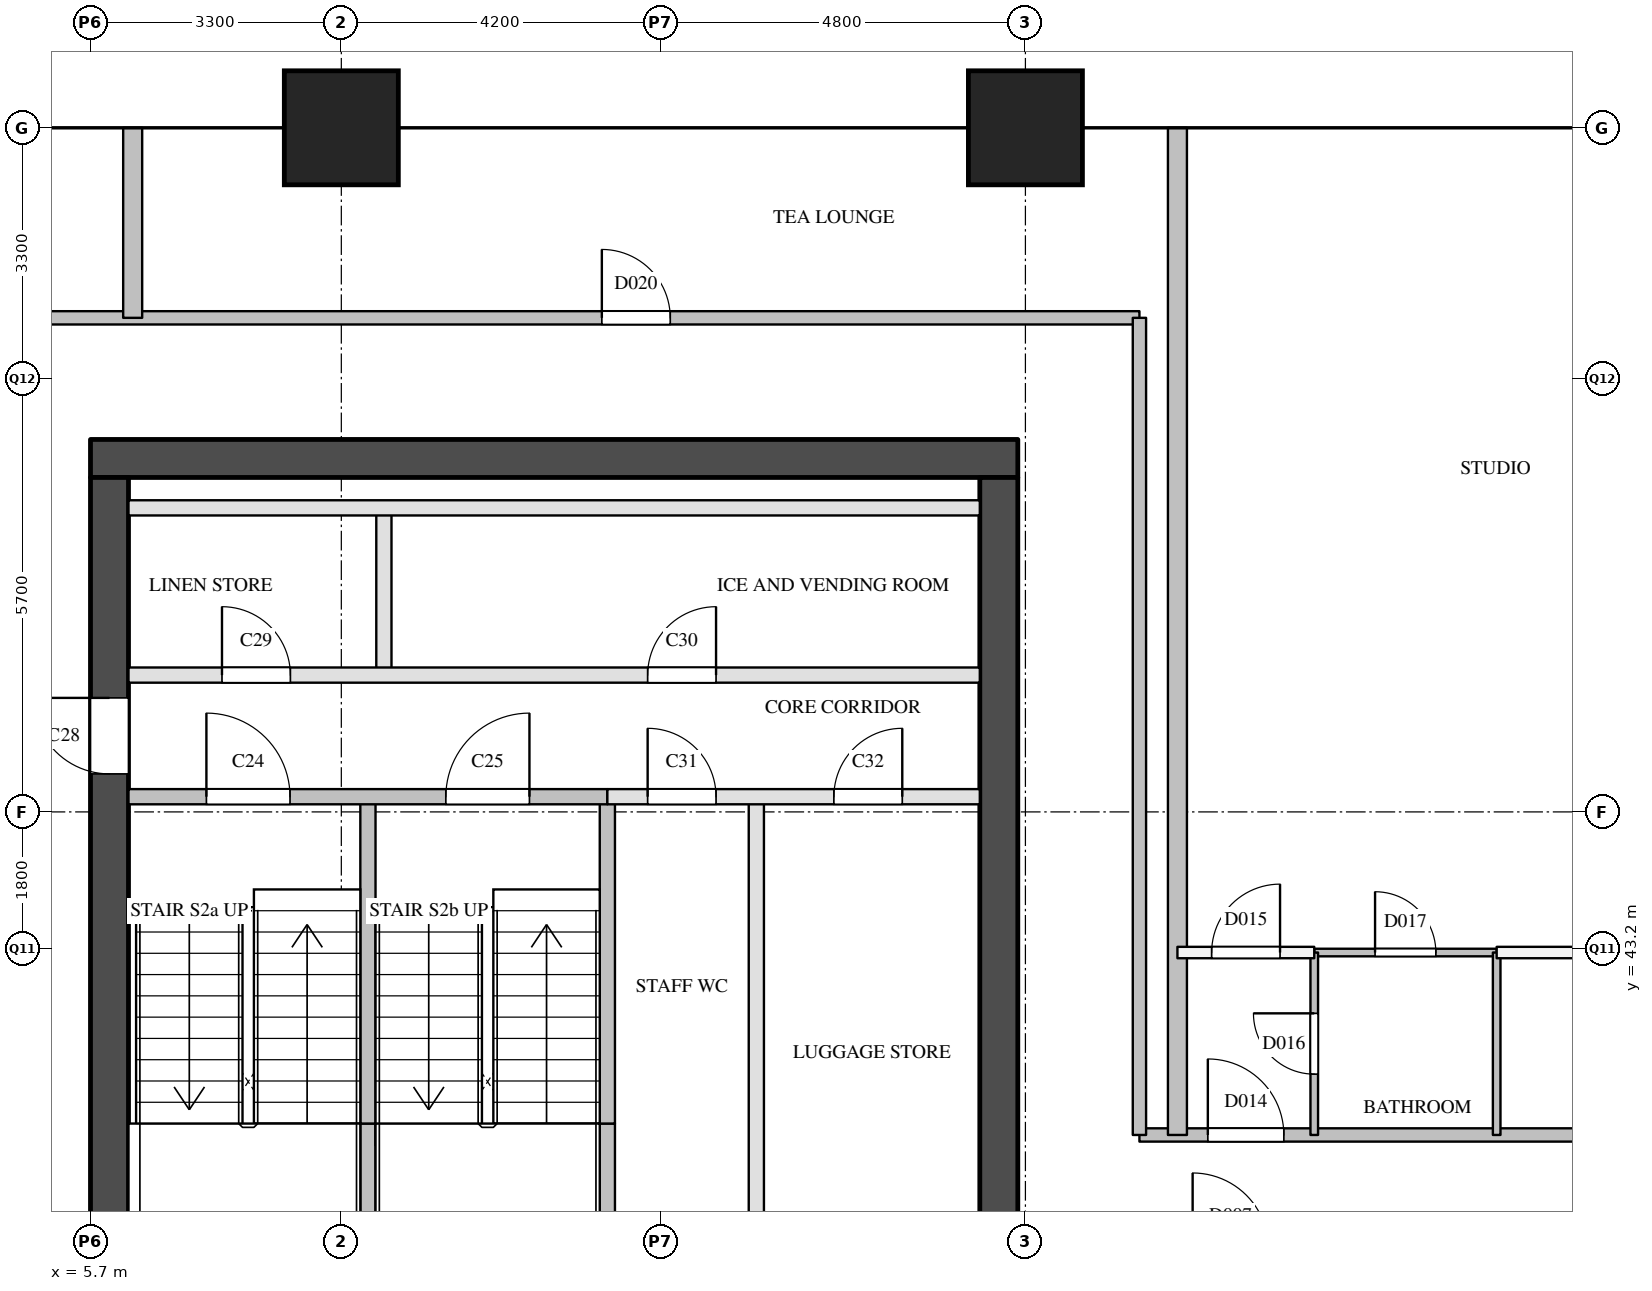
"""IFC4 building model, lengths in metres.
Left out: names, types, materials, properties, quantities, classifications, styles, units other than length and angle.
Written with IfcOpenShell. Run it as: python <this file> out.ifc"""

import sys

from ifc_helpers import new_model, si_unit, direction, frame, frame_2d, origin, origin_2d, place, context, subcontext, project, spatial, rectangle, extrude, element, fill, save


model = new_model("IFC4")
c1 = context("Model", 3, precision=1e-05, world=origin(), true_north=direction((0.0, 1.0)))
c2 = subcontext(c1, "Body", "Model", "MODEL_VIEW")
j1 = project(units=[si_unit("LENGTHUNIT", "METRE"), si_unit("PLANEANGLEUNIT", "RADIAN")], contexts=[c1])
p1 = place(None, origin())
s1 = spatial("IfcSite", under=j1, at=p1, CompositionType="ELEMENT")
p2 = place(p1, origin())
s2 = spatial("IfcBuilding", under=s1, at=p2, CompositionType="ELEMENT")
p3 = place(p2, frame((0.0, 0.0, 142.7)))
s3 = spatial("IfcBuildingStorey", under=s2, at=p3, CompositionType="ELEMENT", Elevation=142.7)
for number, where, z_axis, x_axis in (
    (1, (9.0, 54.0, 0.0), (0.0, 0.0, 1.0), (1.0, 0.0, 0.0)),
    (2, (18.0, 54.0, 0.0), (0.0, 0.0, 1.0), (1.0, 0.0, 0.0)),
):
    element("IfcColumn", number, at=place(p3, frame(where, z_axis=z_axis, x_axis=x_axis)), inside=s3, PredefinedType="COLUMN", context=c2, shape_type="SweptSolid", body=[
        extrude(rectangle(XDim=1.5, YDim=1.5, at=origin_2d()), origin(), (0.0, 0.0, 1.0), 3.9),
    ])
p4 = place(p3, frame((5.7, 49.65, 0.0), z_axis=(0.0, 0.0, 1.0), x_axis=(1.0, 0.0, 0.0)))
e3 = element("IfcWall", 3, at=p4, inside=s3, PredefinedType="SHEAR", context=c2, shape_type="SweptSolid", body=[
    extrude(rectangle(XDim=12.2, YDim=0.5, at=frame_2d((6.1, 0.0))), origin(), (0.0, 0.0, 1.0), 3.6),
])
p5 = place(p3, frame((5.95, 29.1, 0.0), z_axis=(0.0, 0.0, 1.0), x_axis=(0.0, 1.0, 0.0)))
e4 = element("IfcWall", 4, at=p5, inside=s3, PredefinedType="SHEAR", context=c2, shape_type="SweptSolid", body=[
    extrude(rectangle(XDim=20.3, YDim=0.5, at=frame_2d((10.15, 0.0))), origin(), (0.0, 0.0, 1.0), 3.6),
])
p6 = place(p5, frame((3.45, 0.0, 0.0)))
e5 = element("IfcOpeningElement", 5, at=p6, cuts=e4, PredefinedType="OPENING", context=c2, shape_type="SweptSolid", body=[
    extrude(rectangle(XDim=1.0, YDim=2.1, at=frame_2d((0.5, 1.05))), frame((0.0, 0.26, 0.0), z_axis=(0.0, -1.0, 0.0), x_axis=(1.0, 0.0, 0.0)), (0.0, 0.0, 1.0), 0.52),
])
p7 = place(p5, frame((16.4, 0.0, 0.0)))
e6 = element("IfcOpeningElement", 6, at=p7, cuts=e4, PredefinedType="OPENING", context=c2, shape_type="SweptSolid", body=[
    extrude(rectangle(XDim=1.0, YDim=2.1, at=frame_2d((0.5, 1.05))), frame((0.0, 0.26, 0.0), z_axis=(0.0, -1.0, 0.0), x_axis=(1.0, 0.0, 0.0)), (0.0, 0.0, 1.0), 0.52),
])
p8 = place(p3, frame((17.65, 29.1, 0.0), z_axis=(0.0, 0.0, 1.0), x_axis=(0.0, 1.0, 0.0)))
e7 = element("IfcWall", 7, at=p8, inside=s3, PredefinedType="SHEAR", context=c2, shape_type="SweptSolid", body=[
    extrude(rectangle(XDim=20.3, YDim=0.5, at=frame_2d((10.15, 0.0))), origin(), (0.0, 0.0, 1.0), 3.6),
])
p9 = place(p8, frame((1.25, 0.0, 0.0)))
e8 = element("IfcOpeningElement", 8, at=p9, cuts=e7, PredefinedType="OPENING", context=c2, shape_type="SweptSolid", body=[
    extrude(rectangle(XDim=0.7, YDim=2.1, at=frame_2d((0.35, 1.05))), frame((0.0, 0.26, 0.0), z_axis=(0.0, -1.0, 0.0), x_axis=(1.0, 0.0, 0.0)), (0.0, 0.0, 1.0), 0.52),
])
p10 = place(p8, frame((7.05, 0.0, 0.0)))
e9 = element("IfcOpeningElement", 9, at=p10, cuts=e7, PredefinedType="OPENING", context=c2, shape_type="SweptSolid", body=[
    extrude(rectangle(XDim=0.7, YDim=2.1, at=frame_2d((0.35, 1.05))), frame((0.0, 0.26, 0.0), z_axis=(0.0, -1.0, 0.0), x_axis=(1.0, 0.0, 0.0)), (0.0, 0.0, 1.0), 0.52),
])
p11 = place(p8, frame((3.6, 0.0, 0.0)))
e10 = element("IfcOpeningElement", 10, at=p11, cuts=e7, PredefinedType="OPENING", context=c2, shape_type="SweptSolid", body=[
    extrude(rectangle(XDim=1.8, YDim=2.1, at=frame_2d((0.9, 1.05))), frame((0.0, 0.26, 0.0), z_axis=(0.0, -1.0, 0.0), x_axis=(1.0, 0.0, 0.0)), (0.0, 0.0, 1.0), 0.52),
])
p12 = place(p3, frame((9.35, 39.0, 0.0), z_axis=(0.0, 0.0, 1.0), x_axis=(0.0, 1.0, 0.0)))
e11 = element("IfcWall", 11, at=p12, inside=s3, PredefinedType="SOLIDWALL", context=c2, shape_type="SweptSolid", body=[
    extrude(rectangle(XDim=1.9, YDim=0.2, at=frame_2d((0.95, 0.0))), origin(), (0.0, 0.0, 1.0), 3.6),
])
p13 = place(p3, frame((9.35, 40.9, 0.0), z_axis=(0.0, 0.0, 1.0), x_axis=(0.0, 1.0, 0.0)))
e12 = element("IfcWall", 12, at=p13, inside=s3, PredefinedType="SOLIDWALL", context=c2, shape_type="SweptSolid", body=[
    extrude(rectangle(XDim=4.3, YDim=0.2, at=frame_2d((2.15, 0.0))), origin(), (0.0, 0.0, 1.0), 3.6),
])
p14 = place(p3, frame((9.56, 46.8, 0.0), z_axis=(0.0, 0.0, 1.0), x_axis=(0.0, 1.0, 0.0)))
e13 = element("IfcWall", 13, at=p14, inside=s3, PredefinedType="PARTITIONING", context=c2, shape_type="SweptSolid", body=[
    extrude(rectangle(XDim=2.2, YDim=0.2, at=frame_2d((1.1, 0.0))), origin(), (0.0, 0.0, 1.0), 3.6),
])
p15 = place(p3, frame((12.5, 39.0, 0.0), z_axis=(0.0, 0.0, 1.0), x_axis=(0.0, 1.0, 0.0)))
e14 = element("IfcWall", 14, at=p15, inside=s3, PredefinedType="SOLIDWALL", context=c2, shape_type="SweptSolid", body=[
    extrude(rectangle(XDim=1.9, YDim=0.2, at=frame_2d((0.95, 0.0))), origin(), (0.0, 0.0, 1.0), 3.6),
])
p16 = place(p3, frame((12.5, 40.9, 0.0), z_axis=(0.0, 0.0, 1.0), x_axis=(0.0, 1.0, 0.0)))
e15 = element("IfcWall", 15, at=p16, inside=s3, PredefinedType="SOLIDWALL", context=c2, shape_type="SweptSolid", body=[
    extrude(rectangle(XDim=4.3, YDim=0.2, at=frame_2d((2.15, 0.0))), origin(), (0.0, 0.0, 1.0), 3.6),
])
p17 = place(p3, frame((14.46, 39.0, 0.0), z_axis=(0.0, 0.0, 1.0), x_axis=(0.0, 1.0, 0.0)))
e16 = element("IfcWall", 16, at=p17, inside=s3, PredefinedType="PARTITIONING", context=c2, shape_type="SweptSolid", body=[
    extrude(rectangle(XDim=6.2, YDim=0.2, at=frame_2d((3.1, 0.0))), origin(), (0.0, 0.0, 1.0), 3.6),
])
p18 = place(p3, frame((12.5, 45.2, 0.0), z_axis=(0.0, 0.0, 1.0), x_axis=(1.0, 0.0, 0.0)))
e17 = element("IfcWall", 17, at=p18, inside=s3, PredefinedType="PARTITIONING", context=c2, shape_type="SweptSolid", body=[
    extrude(rectangle(XDim=4.9, YDim=0.2, at=frame_2d((2.45, 0.0))), origin(), (0.0, 0.0, 1.0), 3.6),
])
p19 = place(p18, frame((0.53, 0.0, 0.0)))
e18 = element("IfcOpeningElement", 18, at=p19, cuts=e17, PredefinedType="OPENING", context=c2, shape_type="SweptSolid", body=[
    extrude(rectangle(XDim=0.9, YDim=2.1, at=frame_2d((0.45, 1.05))), frame((0.0, 0.11, 0.0), z_axis=(0.0, -1.0, 0.0), x_axis=(1.0, 0.0, 0.0)), (0.0, 0.0, 1.0), 0.22),
])
p20 = place(p18, frame((2.98, 0.0, 0.0)))
e19 = element("IfcOpeningElement", 19, at=p20, cuts=e17, PredefinedType="OPENING", context=c2, shape_type="SweptSolid", body=[
    extrude(rectangle(XDim=0.9, YDim=2.1, at=frame_2d((0.45, 1.05))), frame((0.0, 0.11, 0.0), z_axis=(0.0, -1.0, 0.0), x_axis=(1.0, 0.0, 0.0)), (0.0, 0.0, 1.0), 0.22),
])
p21 = place(p3, frame((6.2, 45.2, 0.0), z_axis=(0.0, 0.0, 1.0), x_axis=(1.0, 0.0, 0.0)))
e20 = element("IfcWall", 20, at=p21, inside=s3, PredefinedType="SOLIDWALL", context=c2, shape_type="SweptSolid", body=[
    extrude(rectangle(XDim=6.3, YDim=0.2, at=frame_2d((3.15, 0.0))), origin(), (0.0, 0.0, 1.0), 3.6),
])
p22 = place(p21, frame((1.025, 0.0, 0.0)))
e21 = element("IfcOpeningElement", 21, at=p22, cuts=e20, PredefinedType="OPENING", context=c2, shape_type="SweptSolid", body=[
    extrude(rectangle(XDim=1.1, YDim=2.1, at=frame_2d((0.55, 1.05))), frame((0.0, 0.11, 0.0), z_axis=(0.0, -1.0, 0.0), x_axis=(1.0, 0.0, 0.0)), (0.0, 0.0, 1.0), 0.22),
])
p23 = place(p21, frame((4.175, 0.0, 0.0)))
e22 = element("IfcOpeningElement", 22, at=p23, cuts=e20, PredefinedType="OPENING", context=c2, shape_type="SweptSolid", body=[
    extrude(rectangle(XDim=1.1, YDim=2.1, at=frame_2d((0.55, 1.05))), frame((0.0, 0.11, 0.0), z_axis=(0.0, -1.0, 0.0), x_axis=(1.0, 0.0, 0.0)), (0.0, 0.0, 1.0), 0.22),
])
p24 = place(p3, frame((6.2, 46.8, 0.0), z_axis=(0.0, 0.0, 1.0), x_axis=(1.0, 0.0, 0.0)))
e23 = element("IfcWall", 23, at=p24, inside=s3, PredefinedType="PARTITIONING", context=c2, shape_type="SweptSolid", body=[
    extrude(rectangle(XDim=11.2, YDim=0.2, at=frame_2d((5.6, 0.0))), origin(), (0.0, 0.0, 1.0), 3.6),
])
p25 = place(p24, frame((1.23, 0.0, 0.0)))
e24 = element("IfcOpeningElement", 24, at=p25, cuts=e23, PredefinedType="OPENING", context=c2, shape_type="SweptSolid", body=[
    extrude(rectangle(XDim=0.9, YDim=2.1, at=frame_2d((0.45, 1.05))), frame((0.0, 0.11, 0.0), z_axis=(0.0, -1.0, 0.0), x_axis=(1.0, 0.0, 0.0)), (0.0, 0.0, 1.0), 0.22),
])
p26 = place(p24, frame((6.83, 0.0, 0.0)))
e25 = element("IfcOpeningElement", 25, at=p26, cuts=e23, PredefinedType="OPENING", context=c2, shape_type="SweptSolid", body=[
    extrude(rectangle(XDim=0.9, YDim=2.1, at=frame_2d((0.45, 1.05))), frame((0.0, 0.11, 0.0), z_axis=(0.0, -1.0, 0.0), x_axis=(1.0, 0.0, 0.0)), (0.0, 0.0, 1.0), 0.22),
])
p27 = place(p3, frame((6.2, 49.0, 0.0), z_axis=(0.0, 0.0, 1.0), x_axis=(1.0, 0.0, 0.0)))
e26 = element("IfcWall", 26, at=p27, inside=s3, PredefinedType="PARTITIONING", context=c2, shape_type="SweptSolid", body=[
    extrude(rectangle(XDim=11.2, YDim=0.2, at=frame_2d((5.6, 0.0))), origin(), (0.0, 0.0, 1.0), 3.6),
])
p28 = place(p3, frame((19.5, 40.75, 0.0), z_axis=(0.0, 0.0, 1.0), x_axis=(1.0, 0.0, 0.0)))
e27 = element("IfcWall", 27, at=p28, inside=s3, PredefinedType="PARTITIONING", context=c2, shape_type="SweptSolid", body=[
    extrude(rectangle(XDim=15.0, YDim=0.175, at=frame_2d((7.5, 0.0))), origin(), (0.0, 0.0, 1.0), 2.6),
])
p29 = place(p28, frame((0.9, 0.0, 0.0)))
e28 = element("IfcOpeningElement", 28, at=p29, cuts=e27, PredefinedType="OPENING", context=c2, shape_type="SweptSolid", body=[
    extrude(rectangle(XDim=1.0, YDim=2.1, at=frame_2d((0.5, 1.05))), frame((0.0, 0.097, 0.0), z_axis=(0.0, -1.0, 0.0), x_axis=(1.0, 0.0, 0.0)), (0.0, 0.0, 1.0), 0.195),
])
p30 = place(p3, frame((4.1, 51.5, 0.0), z_axis=(0.0, 0.0, 1.0), x_axis=(1.0, 0.0, 0.0)))
e29 = element("IfcWall", 29, at=p30, inside=s3, PredefinedType="PARTITIONING", context=c2, shape_type="SweptSolid", body=[
    extrude(rectangle(XDim=15.4, YDim=0.175, at=frame_2d((7.7, 0.0))), origin(), (0.0, 0.0, 1.0), 3.6),
])
p31 = place(p30, frame((8.327, 0.0, 0.0)))
e30 = element("IfcOpeningElement", 30, at=p31, cuts=e29, PredefinedType="OPENING", context=c2, shape_type="SweptSolid", body=[
    extrude(rectangle(XDim=0.9, YDim=2.1, at=frame_2d((0.45, 1.05))), frame((0.0, 0.097, 0.0), z_axis=(0.0, -1.0, 0.0), x_axis=(1.0, 0.0, 0.0)), (0.0, 0.0, 1.0), 0.195),
])
p32 = place(p3, frame((19.5, 40.75, 0.0), z_axis=(0.0, 0.0, 1.0), x_axis=(0.0, 1.0, 0.0)))
e31 = element("IfcWall", 31, at=p32, inside=s3, PredefinedType="PARTITIONING", context=c2, shape_type="SweptSolid", body=[
    extrude(rectangle(XDim=10.75, YDim=0.175, at=frame_2d((5.375, 0.0))), origin(), (0.0, 0.0, 1.0), 3.6),
])
p33 = place(p3, frame((20.0, 43.15, 0.0), z_axis=(0.0, 0.0, 1.0), x_axis=(1.0, 0.0, 0.0)))
e32 = element("IfcWall", 32, at=p33, inside=s3, PredefinedType="PARTITIONING", context=c2, shape_type="SweptSolid", body=[
    extrude(rectangle(XDim=1.8, YDim=0.15, at=frame_2d((0.9, 0.0))), origin(), (0.0, 0.0, 1.0), 3.6),
])
p34 = place(p33, frame((0.45, 0.0, 0.0)))
e33 = element("IfcOpeningElement", 33, at=p34, cuts=e32, PredefinedType="OPENING", context=c2, shape_type="SweptSolid", body=[
    extrude(rectangle(XDim=0.9, YDim=2.1, at=frame_2d((0.45, 1.05))), frame((0.0, 0.085, 0.0), z_axis=(0.0, -1.0, 0.0), x_axis=(1.0, 0.0, 0.0)), (0.0, 0.0, 1.0), 0.17),
])
p35 = place(p3, frame((24.2, 43.15, 0.0), z_axis=(0.0, 0.0, 1.0), x_axis=(1.0, 0.0, 0.0)))
e34 = element("IfcWall", 34, at=p35, inside=s3, PredefinedType="PARTITIONING", context=c2, shape_type="SweptSolid", body=[
    extrude(rectangle(XDim=5.8, YDim=0.15, at=frame_2d((2.9, 0.0))), origin(), (0.0, 0.0, 1.0), 2.6),
])
p36 = place(p35, frame((3.99, 0.0, 0.0)))
e35 = element("IfcOpeningElement", 35, at=p36, cuts=e34, PredefinedType="OPENING", context=c2, shape_type="SweptSolid", body=[
    extrude(rectangle(XDim=0.9, YDim=2.1, at=frame_2d((0.45, 1.05))), frame((0.0, 0.085, 0.0), z_axis=(0.0, -1.0, 0.0), x_axis=(1.0, 0.0, 0.0)), (0.0, 0.0, 1.0), 0.17),
])
p37 = place(p3, frame((6.255, 51.5, 0.0), z_axis=(0.0, 0.0, 1.0), x_axis=(0.0, 1.0, 0.0)))
e36 = element("IfcWall", 36, at=p37, inside=s3, PredefinedType="PARTITIONING", context=c2, shape_type="SweptSolid", body=[
    extrude(rectangle(XDim=2.5, YDim=0.25, at=frame_2d((1.25, 0.0))), origin(), (0.0, 0.0, 1.0), 2.6),
])
p38 = place(p3, frame((20.0, 40.75, 0.0), z_axis=(0.0, 0.0, 1.0), x_axis=(0.0, 1.0, 0.0)))
e37 = element("IfcWall", 37, at=p38, inside=s3, PredefinedType="PARTITIONING", context=c2, shape_type="SweptSolid", body=[
    extrude(rectangle(XDim=13.25, YDim=0.25, at=frame_2d((6.625, 0.0))), origin(), (0.0, 0.0, 1.0), 2.6),
])
p39 = place(p3, frame((21.8, 43.15, 0.0), z_axis=(0.0, 0.0, 1.0), x_axis=(1.0, 0.0, 0.0)))
e38 = element("IfcWall", 38, at=p39, inside=s3, PredefinedType="PARTITIONING", context=c2, shape_type="SweptSolid", body=[
    extrude(rectangle(XDim=2.4, YDim=0.1, at=frame_2d((1.2, 0.0))), origin(), (0.0, 0.0, 1.0), 3.6),
])
p40 = place(p39, frame((0.8, 0.0, 0.0)))
e39 = element("IfcOpeningElement", 39, at=p40, cuts=e38, PredefinedType="OPENING", context=c2, shape_type="SweptSolid", body=[
    extrude(rectangle(XDim=0.8, YDim=2.1, at=frame_2d((0.4, 1.05))), frame((0.0, 0.06, 0.0), z_axis=(0.0, -1.0, 0.0), x_axis=(1.0, 0.0, 0.0)), (0.0, 0.0, 1.0), 0.12),
])
p41 = place(p3, frame((21.8, 40.75, 0.0), z_axis=(0.0, 0.0, 1.0), x_axis=(0.0, 1.0, 0.0)))
e40 = element("IfcWall", 40, at=p41, inside=s3, PredefinedType="PARTITIONING", context=c2, shape_type="SweptSolid", body=[
    extrude(rectangle(XDim=2.4, YDim=0.1, at=frame_2d((1.2, 0.0))), origin(), (0.0, 0.0, 1.0), 3.6),
])
p42 = place(p41, frame((0.8, 0.0, 0.0)))
e41 = element("IfcOpeningElement", 41, at=p42, cuts=e40, PredefinedType="OPENING", context=c2, shape_type="SweptSolid", body=[
    extrude(rectangle(XDim=0.8, YDim=2.1, at=frame_2d((0.4, 1.05))), frame((0.0, 0.06, 0.0), z_axis=(0.0, -1.0, 0.0), x_axis=(1.0, 0.0, 0.0)), (0.0, 0.0, 1.0), 0.12),
])
p43 = place(p3, frame((24.2, 40.75, 0.0), z_axis=(0.0, 0.0, 1.0), x_axis=(0.0, 1.0, 0.0)))
e42 = element("IfcWall", 42, at=p43, inside=s3, PredefinedType="PARTITIONING", context=c2, shape_type="SweptSolid", body=[
    extrude(rectangle(XDim=2.4, YDim=0.1, at=frame_2d((1.2, 0.0))), origin(), (0.0, 0.0, 1.0), 3.6),
])
p44 = place(p22, origin())
e43 = element("IfcDoor", 43, at=p44, inside=s3, OperationType="SINGLE_SWING_LEFT", PredefinedType="DOOR", context=c2, shape_type="SweptSolid", body=[
    extrude(rectangle(XDim=1.1, YDim=2.1, at=frame_2d((0.55, 1.05))), frame((0.0, 0.025, 0.0), z_axis=(0.0, -1.0, 0.0), x_axis=(1.0, 0.0, 0.0)), (0.0, 0.0, 1.0), 0.05),
])
fill(e21, e43)
p45 = place(p23, origin())
e44 = element("IfcDoor", 44, at=p45, inside=s3, OperationType="SINGLE_SWING_RIGHT", PredefinedType="DOOR", context=c2, shape_type="SweptSolid", body=[
    extrude(rectangle(XDim=1.1, YDim=2.1, at=frame_2d((0.55, 1.05))), frame((0.0, 0.025, 0.0), z_axis=(0.0, -1.0, 0.0), x_axis=(1.0, 0.0, 0.0)), (0.0, 0.0, 1.0), 0.05),
])
fill(e22, e44)
p46 = place(p7, origin())
e45 = element("IfcDoor", 45, at=p46, inside=s3, OperationType="SINGLE_SWING_RIGHT", PredefinedType="DOOR", context=c2, shape_type="SweptSolid", body=[
    extrude(rectangle(XDim=1.0, YDim=2.1, at=frame_2d((0.5, 1.05))), frame((0.0, 0.025, 0.0), z_axis=(0.0, -1.0, 0.0), x_axis=(1.0, 0.0, 0.0)), (0.0, 0.0, 1.0), 0.05),
])
fill(e6, e45)
p47 = place(p25, origin())
e46 = element("IfcDoor", 46, at=p47, inside=s3, OperationType="SINGLE_SWING_LEFT", PredefinedType="DOOR", context=c2, shape_type="SweptSolid", body=[
    extrude(rectangle(XDim=0.9, YDim=2.1, at=frame_2d((0.45, 1.05))), frame((0.0, 0.025, 0.0), z_axis=(0.0, -1.0, 0.0), x_axis=(1.0, 0.0, 0.0)), (0.0, 0.0, 1.0), 0.05),
])
fill(e24, e46)
p48 = place(p26, origin())
e47 = element("IfcDoor", 47, at=p48, inside=s3, OperationType="SINGLE_SWING_RIGHT", PredefinedType="DOOR", context=c2, shape_type="SweptSolid", body=[
    extrude(rectangle(XDim=0.9, YDim=2.1, at=frame_2d((0.45, 1.05))), frame((0.0, 0.025, 0.0), z_axis=(0.0, -1.0, 0.0), x_axis=(1.0, 0.0, 0.0)), (0.0, 0.0, 1.0), 0.05),
])
fill(e25, e47)
p49 = place(p19, origin())
e48 = element("IfcDoor", 48, at=p49, inside=s3, OperationType="SINGLE_SWING_LEFT", PredefinedType="DOOR", context=c2, shape_type="SweptSolid", body=[
    extrude(rectangle(XDim=0.9, YDim=2.1, at=frame_2d((0.45, 1.05))), frame((0.0, 0.025, 0.0), z_axis=(0.0, -1.0, 0.0), x_axis=(1.0, 0.0, 0.0)), (0.0, 0.0, 1.0), 0.05),
])
fill(e18, e48)
p50 = place(p20, origin())
e49 = element("IfcDoor", 49, at=p50, inside=s3, OperationType="SINGLE_SWING_RIGHT", PredefinedType="DOOR", context=c2, shape_type="SweptSolid", body=[
    extrude(rectangle(XDim=0.9, YDim=2.1, at=frame_2d((0.45, 1.05))), frame((0.0, 0.025, 0.0), z_axis=(0.0, -1.0, 0.0), x_axis=(1.0, 0.0, 0.0)), (0.0, 0.0, 1.0), 0.05),
])
fill(e19, e49)
p51 = place(p29, origin())
e50 = element("IfcDoor", 50, at=p51, inside=s3, OperationType="SINGLE_SWING_LEFT", PredefinedType="DOOR", context=c2, shape_type="SweptSolid", body=[
    extrude(rectangle(XDim=1.0, YDim=2.1, at=frame_2d((0.5, 1.05))), frame((0.0, 0.025, 0.0), z_axis=(0.0, -1.0, 0.0), x_axis=(1.0, 0.0, 0.0)), (0.0, 0.0, 1.0), 0.05),
])
fill(e28, e50)
p52 = place(p34, origin())
e51 = element("IfcDoor", 51, at=p52, inside=s3, OperationType="SINGLE_SWING_RIGHT", PredefinedType="DOOR", context=c2, shape_type="SweptSolid", body=[
    extrude(rectangle(XDim=0.9, YDim=2.1, at=frame_2d((0.45, 1.05))), frame((0.0, 0.025, 0.0), z_axis=(0.0, -1.0, 0.0), x_axis=(1.0, 0.0, 0.0)), (0.0, 0.0, 1.0), 0.05),
])
fill(e33, e51)
p53 = place(p42, origin())
e52 = element("IfcDoor", 52, at=p53, inside=s3, OperationType="SINGLE_SWING_RIGHT", PredefinedType="DOOR", context=c2, shape_type="SweptSolid", body=[
    extrude(rectangle(XDim=0.8, YDim=2.1, at=frame_2d((0.4, 1.05))), frame((0.0, 0.025, 0.0), z_axis=(0.0, -1.0, 0.0), x_axis=(1.0, 0.0, 0.0)), (0.0, 0.0, 1.0), 0.05),
])
fill(e41, e52)
p54 = place(p40, origin())
e53 = element("IfcDoor", 53, at=p54, inside=s3, OperationType="SINGLE_SWING_LEFT", PredefinedType="DOOR", context=c2, shape_type="SweptSolid", body=[
    extrude(rectangle(XDim=0.8, YDim=2.1, at=frame_2d((0.4, 1.05))), frame((0.0, 0.025, 0.0), z_axis=(0.0, -1.0, 0.0), x_axis=(1.0, 0.0, 0.0)), (0.0, 0.0, 1.0), 0.05),
])
fill(e39, e53)
p55 = place(p31, origin())
e54 = element("IfcDoor", 54, at=p55, inside=s3, OperationType="SINGLE_SWING_LEFT", PredefinedType="DOOR", context=c2, shape_type="SweptSolid", body=[
    extrude(rectangle(XDim=0.9, YDim=2.1, at=frame_2d((0.45, 1.05))), frame((0.0, 0.025, 0.0), z_axis=(0.0, -1.0, 0.0), x_axis=(1.0, 0.0, 0.0)), (0.0, 0.0, 1.0), 0.05),
])
fill(e30, e54)
save(model, sys.argv[1])
